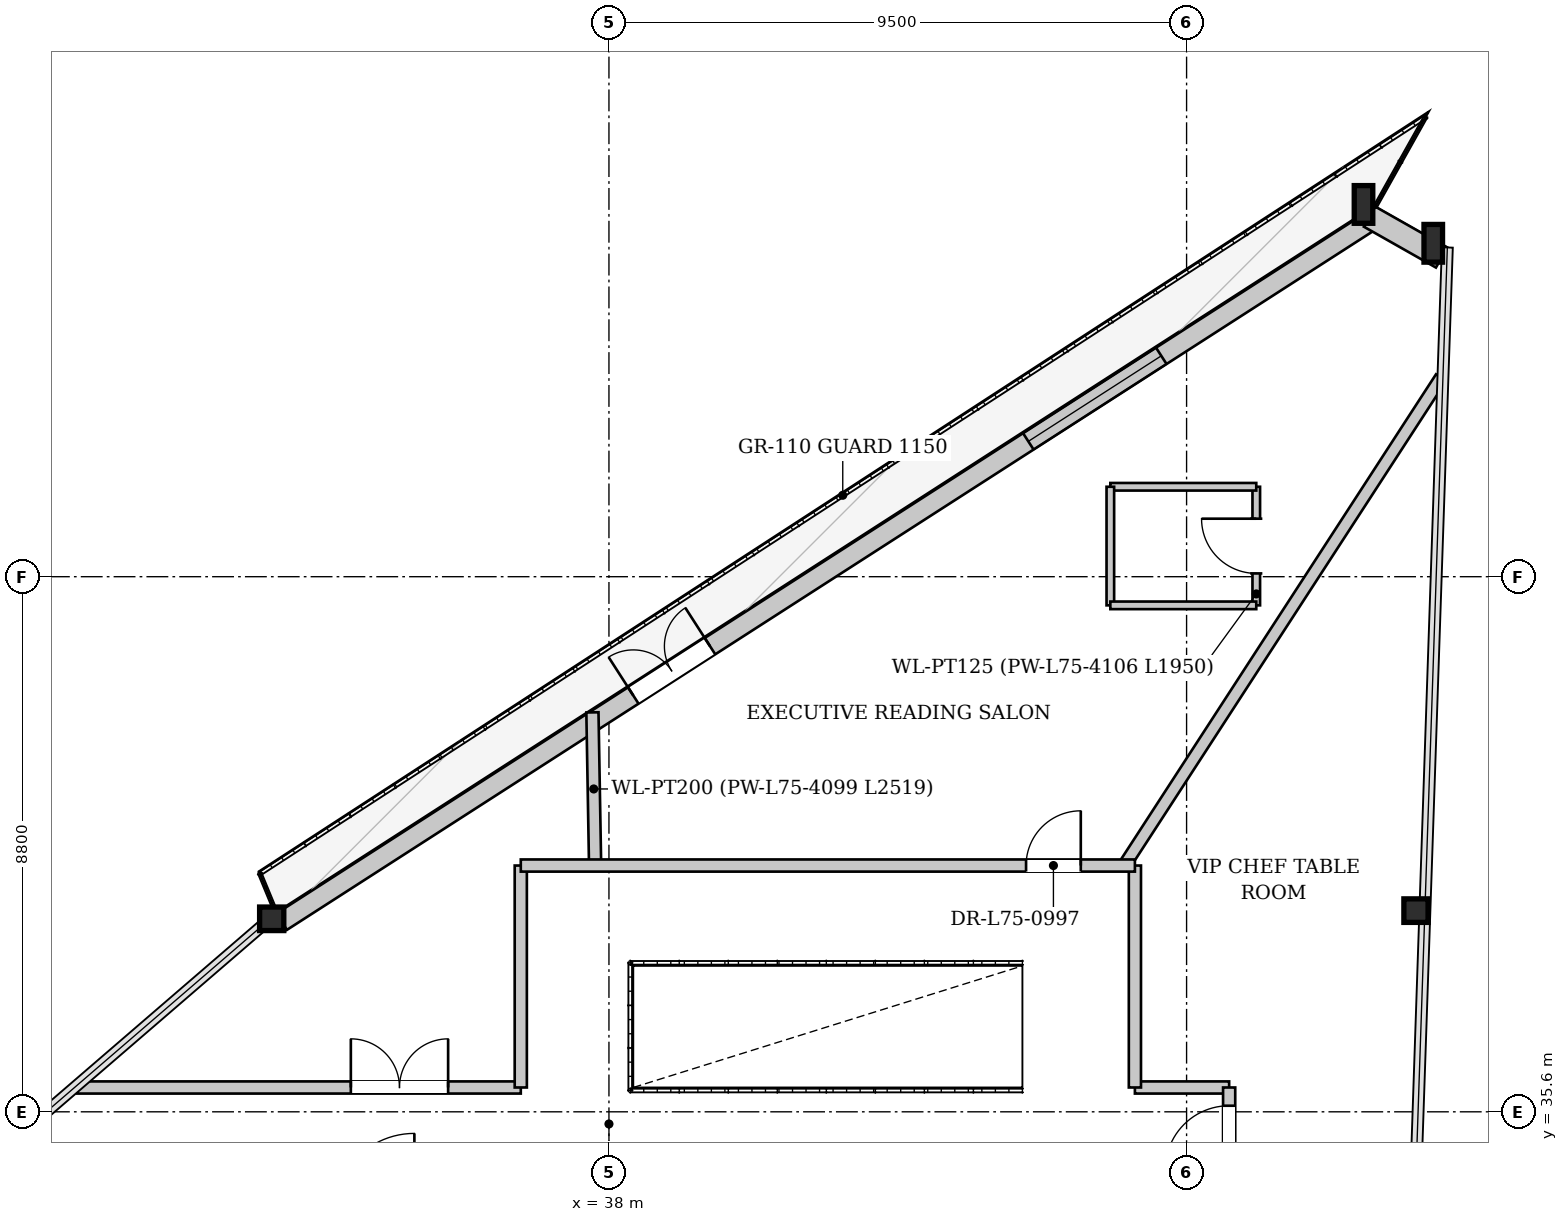
"""IFC4 building model, lengths in metres.
Left out: names, types, materials, properties, quantities, classifications, styles, units other than length and angle.
Written with IfcOpenShell. Run it as: python <this file> out.ifc"""

import sys

from ifc_helpers import new_model, si_unit, direction, frame, frame_2d, origin, origin_2d, place, context, subcontext, project, spatial, rectangle, i_section, extrude, source, transform, mapped, element, fill, save


model = new_model("IFC4")
c1 = context("Model", 3, precision=1e-05, world=origin(), true_north=direction((0.0, 1.0)))
c2 = subcontext(c1, "Body", "Model", "MODEL_VIEW")
j1 = project(units=[si_unit("LENGTHUNIT", "METRE"), si_unit("PLANEANGLEUNIT", "RADIAN")], contexts=[c1])
p1 = place(None, origin())
s1 = spatial("IfcSite", under=j1, at=p1, CompositionType="ELEMENT")
p2 = place(p1, origin())
s2 = spatial("IfcBuilding", under=s1, at=p2, CompositionType="ELEMENT")
p3 = place(p2, frame((0.0, 0.0, 281.9)))
s3 = spatial("IfcBuildingStorey", under=s2, at=p3, CompositionType="ELEMENT", Elevation=281.9)
m1 = source(origin(), c2, "Body", "SweptSolid", [
    extrude(i_section(OverallWidth=0.305, OverallDepth=0.62, WebThickness=0.021, FlangeThickness=0.04, at=origin_2d()), origin(), (0.0, 0.0, 1.0), 3.965),
])
p4 = place(p3, frame((51.788, 49.814, 0.0), z_axis=(-0.116756713221, 0.034669846806, 0.992555223471), x_axis=(-0.284656369673, -0.958629621493, 0.0)))
e1 = element("IfcColumn", 1, at=p4, inside=s3, PredefinedType="COLUMN", context=c2, shape_type="MappedRepresentation", body=[
    mapped(m1, transform((0.0, 0.0, 0.0), x_axis=(1.0, 0.0, 0.0), y_axis=(0.0, 1.0, 0.0), z_axis=(0.0, 0.0, 1.0), scale=1.0)),
])
m2 = source(origin(), c2, "Body", "SweptSolid", [
    extrude(i_section(OverallWidth=0.305, OverallDepth=0.62, WebThickness=0.021, FlangeThickness=0.04, at=origin_2d()), origin(), (0.0, 0.0, 1.0), 3.955),
])
p5 = place(p3, frame((50.603, 50.486, 0.0), z_axis=(-0.097849200972, 0.018088211915, 0.995036858844), x_axis=(-0.181778226505, -0.983339552936, 0.0)))
e2 = element("IfcColumn", 2, at=p5, inside=s3, PredefinedType="COLUMN", context=c2, shape_type="MappedRepresentation", body=[
    mapped(m2, transform((0.0, 0.0, 0.0), x_axis=(1.0, 0.0, 0.0), y_axis=(0.0, 1.0, 0.0), z_axis=(0.0, 0.0, 1.0), scale=1.0)),
])
m3 = source(origin(), c2, "Body", "SweptSolid", [
    extrude(i_section(OverallWidth=0.398, OverallDepth=0.387, WebThickness=0.019, FlangeThickness=0.029, at=origin_2d()), origin(), (0.0, 0.0, 1.0), 3.942),
])
p6 = place(p3, frame((32.531, 38.861, 0.0), z_axis=(-0.039204330558, -0.044159064278, 0.9982549762), x_axis=(0.747814244306, -0.663908017736, 0.0)))
e3 = element("IfcColumn", 3, at=p6, inside=s3, PredefinedType="COLUMN", context=c2, shape_type="MappedRepresentation", body=[
    mapped(m3, transform((0.0, 0.0, 0.0), x_axis=(1.0, 0.0, 0.0), y_axis=(0.0, 1.0, 0.0), z_axis=(0.0, 0.0, 1.0), scale=1.0)),
])
m4 = source(origin(), c2, "Body", "SweptSolid", [
    extrude(i_section(OverallWidth=0.398, OverallDepth=0.387, WebThickness=0.019, FlangeThickness=0.029, at=origin_2d()), origin(), (0.0, 0.0, 1.0), 3.949),
])
p7 = place(p3, frame((51.417, 38.826, 0.0), z_axis=(-0.072828075966, 0.041730858469, 0.996471076752), x_axis=(-0.497169755353, -0.867653291564, 0.0)))
e4 = element("IfcColumn", 4, at=p7, inside=s3, PredefinedType="COLUMN", context=c2, shape_type="MappedRepresentation", body=[
    mapped(m4, transform((0.0, 0.0, 0.0), x_axis=(1.0, 0.0, 0.0), y_axis=(0.0, 1.0, 0.0), z_axis=(0.0, 0.0, 1.0), scale=1.0)),
])
p8 = place(p3, frame((32.617, 38.727, 0.0), z_axis=(0.0, 0.0, 1.0), x_axis=(0.841031155516, 0.540986686944, 0.0)))
e5 = element("IfcWall", 5, at=p8, inside=s3, PredefinedType="SOLIDWALL", context=c2, shape_type="SweptSolid", body=[
    extrude(rectangle(XDim=21.489, YDim=0.32, at=frame_2d((10.744, 0.0))), origin(), (0.0, 0.0, 1.0), 3.462),
])
p9 = place(p8, frame((6.876, 0.0, 0.0)))
e6 = element("IfcOpeningElement", 6, at=p9, cuts=e5, PredefinedType="OPENING", context=c2, shape_type="SweptSolid", body=[
    extrude(rectangle(XDim=1.5, YDim=2.3, at=frame_2d((0.75, 1.15))), frame((0.0, 0.17, 0.0), z_axis=(0.0, -1.0, 0.0), x_axis=(1.0, 0.0, 0.0)), (0.0, 0.0, 1.0), 0.34),
])
p10 = place(p8, frame((14.601, 0.0, 0.65)))
e7 = element("IfcOpeningElement", 7, at=p10, cuts=e5, PredefinedType="OPENING", context=c2, shape_type="SweptSolid", body=[
    extrude(rectangle(XDim=2.6, YDim=2.35, at=frame_2d((1.3, 1.175))), frame((0.0, 0.17, 0.0), z_axis=(0.0, -1.0, 0.0), x_axis=(1.0, 0.0, 0.0)), (0.0, 0.0, 1.0), 0.34),
])
p11 = place(p3, frame((50.51, 50.321, 0.0), z_axis=(0.0, 0.0, 1.0), x_axis=(0.869914545073, -0.493202477965, 0.0)))
e8 = element("IfcWall", 8, at=p11, inside=s3, PredefinedType="SOLIDWALL", context=c2, shape_type="SweptSolid", body=[
    extrude(rectangle(XDim=1.362, YDim=0.38, at=frame_2d((0.681, 0.0))), origin(), (0.0, 0.0, 1.0), 3.462),
])
p12 = place(p3, frame((37.772, 39.65, 0.0), z_axis=(0.0, 0.0, 1.0), x_axis=(-0.01744427747, 0.999847837015, 0.0)))
e9 = element("IfcWall", 9, at=p12, inside=s3, PredefinedType="PARTITIONING", context=c2, shape_type="SweptSolid", body=[
    extrude(rectangle(XDim=2.519, YDim=0.2, at=frame_2d((1.26, 0.0))), origin(), (0.0, 0.0, 1.0), 3.92),
])
p13 = place(p3, frame((46.475, 39.65, 0.0), z_axis=(0.0, 0.0, 1.0), x_axis=(0.54461430033, 0.838686630319, 0.0)))
e10 = element("IfcWall", 10, at=p13, inside=s3, PredefinedType="PARTITIONING", context=c2, shape_type="SweptSolid", body=[
    extrude(rectangle(XDim=9.568, YDim=0.2, at=frame_2d((4.784, 0.0))), origin(), (0.0, 0.0, 1.0), 3.455),
])
p14 = place(p3, frame((48.646, 43.929, 0.0), z_axis=(0.0, 0.0, 1.0), x_axis=(0.0, 1.0, 0.0)))
e11 = element("IfcWall", 11, at=p14, inside=s3, PredefinedType="PARTITIONING", context=c2, shape_type="SweptSolid", body=[
    extrude(rectangle(XDim=1.95, YDim=0.125, at=frame_2d((0.975, 0.0))), origin(), (0.0, 0.0, 1.0), 3.595),
])
p15 = place(p14, frame((0.525, 0.0, 0.0)))
e12 = element("IfcOpeningElement", 12, at=p15, cuts=e11, PredefinedType="OPENING", context=c2, shape_type="SweptSolid", body=[
    extrude(rectangle(XDim=0.9, YDim=2.1, at=frame_2d((0.45, 1.05))), frame((0.0, 0.073, 0.0), z_axis=(0.0, -1.0, 0.0), x_axis=(1.0, 0.0, 0.0)), (0.0, 0.0, 1.0), 0.145),
])
p16 = place(p3, frame((48.646, 45.879, 0.0), z_axis=(0.0, 0.0, 1.0), x_axis=(-1.0, 0.0, 0.0)))
e13 = element("IfcWall", 13, at=p16, inside=s3, PredefinedType="PARTITIONING", context=c2, shape_type="SweptSolid", body=[
    extrude(rectangle(XDim=2.4, YDim=0.125, at=frame_2d((1.2, 0.0))), origin(), (0.0, 0.0, 1.0), 3.92),
])
p17 = place(p3, frame((46.246, 45.879, 0.0), z_axis=(0.0, 0.0, 1.0), x_axis=(0.0, -1.0, 0.0)))
e14 = element("IfcWall", 14, at=p17, inside=s3, PredefinedType="PARTITIONING", context=c2, shape_type="SweptSolid", body=[
    extrude(rectangle(XDim=1.95, YDim=0.125, at=frame_2d((0.975, 0.0))), origin(), (0.0, 0.0, 1.0), 3.92),
])
p18 = place(p3, frame((46.246, 43.929, 0.0), z_axis=(0.0, 0.0, 1.0), x_axis=(1.0, 0.0, 0.0)))
e15 = element("IfcWall", 15, at=p18, inside=s3, PredefinedType="PARTITIONING", context=c2, shape_type="SweptSolid", body=[
    extrude(rectangle(XDim=2.4, YDim=0.125, at=frame_2d((1.2, 0.0))), origin(), (0.0, 0.0, 1.0), 3.545),
])
p19 = place(p3, frame((29.257, 36.0, 0.0), z_axis=(0.0, 0.0, 1.0), x_axis=(1.0, 0.0, 0.0)))
e16 = element("IfcWall", 16, at=p19, inside=s3, PredefinedType="PARTITIONING", context=c2, shape_type="SweptSolid", body=[
    extrude(rectangle(XDim=7.293, YDim=0.2, at=frame_2d((3.646, 0.0))), origin(), (0.0, 0.0, 1.0), 3.92),
])
p20 = place(p19, frame((4.498, 0.0, 0.0)))
e17 = element("IfcOpeningElement", 17, at=p20, cuts=e16, PredefinedType="OPENING", context=c2, shape_type="SweptSolid", body=[
    extrude(rectangle(XDim=1.6, YDim=2.2, at=frame_2d((0.8, 1.1))), frame((0.0, 0.11, 0.0), z_axis=(0.0, -1.0, 0.0), x_axis=(1.0, 0.0, 0.0)), (0.0, 0.0, 1.0), 0.22),
])
p21 = place(p3, frame((46.65, 36.0, 0.0), z_axis=(0.0, 0.0, 1.0), x_axis=(1.0, 0.0, 0.0)))
e18 = element("IfcWall", 18, at=p21, inside=s3, PredefinedType="PARTITIONING", context=c2, shape_type="SweptSolid", body=[
    extrude(rectangle(XDim=1.55, YDim=0.2, at=frame_2d((0.775, 0.0))), origin(), (0.0, 0.0, 1.0), 3.92),
])
p22 = place(p3, frame((48.2, 23.0, 0.0), z_axis=(0.0, 0.0, 1.0), x_axis=(0.0, 1.0, 0.0)))
e19 = element("IfcWall", 19, at=p22, inside=s3, PredefinedType="PARTITIONING", context=c2, shape_type="SweptSolid", body=[
    extrude(rectangle(XDim=13.0, YDim=0.2, at=frame_2d((6.5, 0.0))), origin(), (0.0, 0.0, 1.0), 3.665),
])
p23 = place(p22, frame((1.911, 0.0, 0.0)))
e20 = element("IfcOpeningElement", 20, at=p23, cuts=e19, PredefinedType="OPENING", context=c2, shape_type="SweptSolid", body=[
    extrude(rectangle(XDim=1.05, YDim=2.2, at=frame_2d((0.525, 1.1))), frame((0.0, 0.11, 0.0), z_axis=(0.0, -1.0, 0.0), x_axis=(1.0, 0.0, 0.0)), (0.0, 0.0, 1.0), 0.22),
])
p24 = place(p22, frame((11.65, 0.0, 0.0)))
e21 = element("IfcOpeningElement", 21, at=p24, cuts=e19, PredefinedType="OPENING", context=c2, shape_type="SweptSolid", body=[
    extrude(rectangle(XDim=1.05, YDim=2.2, at=frame_2d((0.525, 1.1))), frame((0.0, 0.11, 0.0), z_axis=(0.0, -1.0, 0.0), x_axis=(1.0, 0.0, 0.0)), (0.0, 0.0, 1.0), 0.22),
])
for number, where, z_axis, x_axis in (
    (22, (36.55, 36.0, 0.0), (0.0, 0.0, 1.0), (0.0, 1.0, 0.0)),
    (23, (46.65, 36.0, 0.0), (0.0, 0.0, 1.0), (0.0, 1.0, 0.0)),
):
    element("IfcWall", number, at=place(p3, frame(where, z_axis=z_axis, x_axis=x_axis)), inside=s3, PredefinedType="PARTITIONING", context=c2, shape_type="SweptSolid", body=[
        extrude(rectangle(XDim=3.65, YDim=0.2, at=frame_2d((1.825, 0.0))), origin(), (0.0, 0.0, 1.0), 3.92),
    ])
p25 = place(p3, frame((36.55, 39.65, 0.0), z_axis=(0.0, 0.0, 1.0), x_axis=(1.0, 0.0, 0.0)))
e24 = element("IfcWall", 24, at=p25, inside=s3, PredefinedType="PARTITIONING", context=c2, shape_type="SweptSolid", body=[
    extrude(rectangle(XDim=10.1, YDim=0.2, at=frame_2d((5.05, 0.0))), origin(), (0.0, 0.0, 1.0), 3.545),
])
p26 = place(p25, frame((8.31, 0.0, 0.0)))
e25 = element("IfcOpeningElement", 25, at=p26, cuts=e24, PredefinedType="OPENING", context=c2, shape_type="SweptSolid", body=[
    extrude(rectangle(XDim=0.9, YDim=2.1, at=frame_2d((0.45, 1.05))), frame((0.0, 0.11, 0.0), z_axis=(0.0, -1.0, 0.0), x_axis=(1.0, 0.0, 0.0)), (0.0, 0.0, 1.0), 0.22),
])
m5 = source(origin(), c2, "Body", "SweptSolid", [
    extrude(rectangle(XDim=1.5, YDim=2.3, at=frame_2d((0.75, 1.15))), frame((0.0, 0.025, 0.0), z_axis=(0.0, -1.0, 0.0), x_axis=(1.0, 0.0, 0.0)), (0.0, 0.0, 1.0), 0.05),
])
p27 = place(p9, origin())
e26 = element("IfcDoor", 26, at=p27, inside=s3, OperationType="DOUBLE_DOOR_SINGLE_SWING", PredefinedType="DOOR", context=c2, shape_type="MappedRepresentation", body=[
    mapped(m5, transform((0.0, 0.0, 0.0), x_axis=(1.0, 0.0, 0.0), y_axis=(0.0, 1.0, 0.0), z_axis=(0.0, 0.0, 1.0), scale=1.0)),
])
fill(e6, e26)
m6 = source(origin(), c2, "Body", "SweptSolid", [
    extrude(rectangle(XDim=2.6, YDim=2.35, at=frame_2d((1.3, 1.175))), frame((0.0, 0.03, 0.0), z_axis=(0.0, -1.0, 0.0), x_axis=(1.0, 0.0, 0.0)), (0.0, 0.0, 1.0), 0.06),
])
p28 = place(p10, origin())
e27 = element("IfcWindow", 27, at=p28, inside=s3, PartitioningType="SINGLE_PANEL", PredefinedType="WINDOW", context=c2, shape_type="MappedRepresentation", body=[
    mapped(m6, transform((0.0, 0.0, 0.0), x_axis=(1.0, 0.0, 0.0), y_axis=(0.0, 1.0, 0.0), z_axis=(0.0, 0.0, 1.0), scale=1.0)),
])
fill(e7, e27)
m7 = source(origin(), c2, "Body", "SweptSolid", [
    extrude(rectangle(XDim=0.9, YDim=2.1, at=frame_2d((0.45, 1.05))), frame((0.0, 0.025, 0.0), z_axis=(0.0, -1.0, 0.0), x_axis=(1.0, 0.0, 0.0)), (0.0, 0.0, 1.0), 0.05),
])
p29 = place(p15, origin())
e28 = element("IfcDoor", 28, at=p29, inside=s3, OperationType="SINGLE_SWING_RIGHT", PredefinedType="DOOR", context=c2, shape_type="MappedRepresentation", body=[
    mapped(m7, transform((0.0, 0.0, 0.0), x_axis=(1.0, 0.0, 0.0), y_axis=(0.0, 1.0, 0.0), z_axis=(0.0, 0.0, 1.0), scale=1.0)),
])
fill(e12, e28)
m8 = source(origin(), c2, "Body", "SweptSolid", [
    extrude(rectangle(XDim=1.6, YDim=2.2, at=frame_2d((0.8, 1.1))), frame((0.0, 0.025, 0.0), z_axis=(0.0, -1.0, 0.0), x_axis=(1.0, 0.0, 0.0)), (0.0, 0.0, 1.0), 0.05),
])
p30 = place(p20, origin())
e29 = element("IfcDoor", 29, at=p30, inside=s3, OperationType="DOUBLE_DOOR_SINGLE_SWING", PredefinedType="DOOR", context=c2, shape_type="MappedRepresentation", body=[
    mapped(m8, transform((0.0, 0.0, 0.0), x_axis=(1.0, 0.0, 0.0), y_axis=(0.0, 1.0, 0.0), z_axis=(0.0, 0.0, 1.0), scale=1.0)),
])
fill(e17, e29)
m9 = source(origin(), c2, "Body", "SweptSolid", [
    extrude(rectangle(XDim=1.05, YDim=2.2, at=frame_2d((0.525, 1.1))), frame((0.0, 0.025, 0.0), z_axis=(0.0, -1.0, 0.0), x_axis=(1.0, 0.0, 0.0)), (0.0, 0.0, 1.0), 0.05),
])
p31 = place(p24, origin())
e30 = element("IfcDoor", 30, at=p31, inside=s3, OperationType="SINGLE_SWING_LEFT", PredefinedType="DOOR", context=c2, shape_type="MappedRepresentation", body=[
    mapped(m9, transform((0.0, 0.0, 0.0), x_axis=(1.0, 0.0, 0.0), y_axis=(0.0, 1.0, 0.0), z_axis=(0.0, 0.0, 1.0), scale=1.0)),
])
fill(e21, e30)
p32 = place(p26, origin())
e31 = element("IfcDoor", 31, at=p32, inside=s3, OperationType="SINGLE_SWING_RIGHT", PredefinedType="DOOR", context=c2, shape_type="MappedRepresentation", body=[
    mapped(m7, transform((0.0, 0.0, 0.0), x_axis=(1.0, 0.0, 0.0), y_axis=(0.0, 1.0, 0.0), z_axis=(0.0, 0.0, 1.0), scale=1.0)),
])
fill(e25, e31)
save(model, sys.argv[1])
